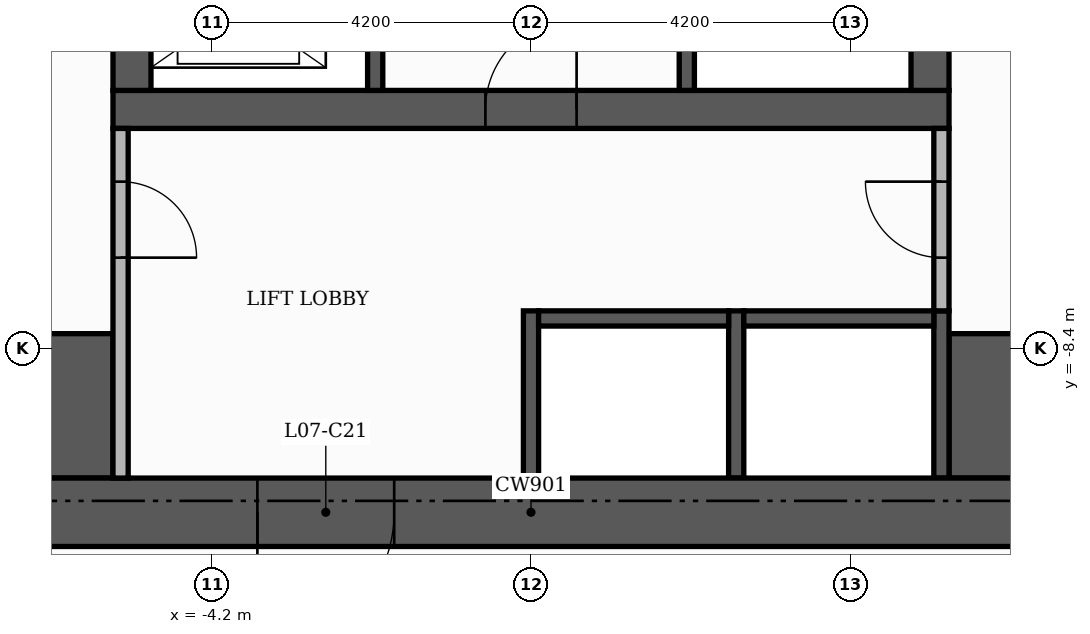
"""IFC4 building model, lengths in metres.
Left out: names, types, materials, properties, quantities, classifications, styles, units other than length and angle.
Written with IfcOpenShell. Run it as: python <this file> out.ifc"""

import sys

from ifc_helpers import new_model, si_unit, direction, frame, frame_2d, origin, place, context, subcontext, project, spatial, rectangle, extrude, element, fill, save


model = new_model("IFC4")
c1 = context("Model", 3, precision=1e-05, world=origin(), true_north=direction((0.0, 1.0)))
c2 = subcontext(c1, "Body", "Model", "MODEL_VIEW")
j1 = project(units=[si_unit("LENGTHUNIT", "METRE"), si_unit("PLANEANGLEUNIT", "RADIAN")], contexts=[c1])
p1 = place(None, origin())
s1 = spatial("IfcSite", under=j1, at=p1, CompositionType="ELEMENT")
p2 = place(p1, origin())
s2 = spatial("IfcBuilding", under=s1, at=p2, CompositionType="ELEMENT")
p3 = place(p2, frame((0.0, 0.0, 34.8)))
s3 = spatial("IfcBuildingStorey", under=s2, at=p3, CompositionType="ELEMENT", Elevation=34.8)
p4 = place(p3, frame((-5.5, -5.25, 0.0), z_axis=(0.0, 0.0, 1.0), x_axis=(1.0, 0.0, 0.0)))
e1 = element("IfcWall", 1, at=p4, inside=s3, PredefinedType="SHEAR", context=c2, shape_type="SweptSolid", body=[
    extrude(rectangle(XDim=11.0, YDim=0.5, at=frame_2d((5.5, 0.0))), origin(), (0.0, 0.0, 1.0), 3.48),
])
p5 = place(p4, frame((4.9, 0.0, 0.0)))
e2 = element("IfcOpeningElement", 2, at=p5, cuts=e1, PredefinedType="OPENING", context=c2, shape_type="SweptSolid", body=[
    extrude(rectangle(XDim=1.2, YDim=2.1, at=frame_2d((0.6, 1.05))), frame((0.0, 0.26, 0.0), z_axis=(0.0, -1.0, 0.0), x_axis=(1.0, 0.0, 0.0)), (0.0, 0.0, 1.0), 0.52),
])
for number, where, z_axis, x_axis in (
    (3, (-5.25, -5.0, 0.0), (0.0, 0.0, 1.0), (0.0, 1.0, 0.0)),
    (4, (5.25, -5.0, 0.0), (0.0, 0.0, 1.0), (0.0, 1.0, 0.0)),
):
    element("IfcWall", number, at=place(p3, frame(where, z_axis=z_axis, x_axis=x_axis)), inside=s3, PredefinedType="SHEAR", context=c2, shape_type="SweptSolid", body=[
        extrude(rectangle(XDim=10.5, YDim=0.5, at=frame_2d((5.25, 0.0))), origin(), (0.0, 0.0, 1.0), 3.48),
    ])
for number, where, z_axis, x_axis in (
    (5, (-10.1, -9.15, 0.0), (0.0, 0.0, 1.0), (1.0, 0.0, 0.0)),
    (6, (5.5, -9.15, 0.0), (0.0, 0.0, 1.0), (1.0, 0.0, 0.0)),
):
    element("IfcWall", number, at=place(p3, frame(where, z_axis=z_axis, x_axis=x_axis)), inside=s3, PredefinedType="SHEAR", context=c2, shape_type="SweptSolid", body=[
        extrude(rectangle(XDim=4.6, YDim=1.9, at=frame_2d((2.3, 0.0))), origin(), (0.0, 0.0, 1.0), 3.48),
    ])
p6 = place(p3, frame((2.05, -5.0, 0.0), z_axis=(0.0, 0.0, 1.0), x_axis=(0.0, 1.0, 0.0)))
e7 = element("IfcWall", 7, at=p6, inside=s3, PredefinedType="SHEAR", context=c2, shape_type="SweptSolid", body=[
    extrude(rectangle(XDim=6.6, YDim=0.2, at=frame_2d((3.3, 0.0))), origin(), (0.0, 0.0, 1.0), 3.48),
])
p7 = place(p6, frame((5.25, 0.0, 0.0)))
e8 = element("IfcOpeningElement", 8, at=p7, cuts=e7, PredefinedType="OPENING", context=c2, shape_type="SweptSolid", body=[
    extrude(rectangle(XDim=1.0, YDim=2.1, at=frame_2d((0.5, 1.05))), frame((0.0, 0.11, 0.0), z_axis=(0.0, -1.0, 0.0), x_axis=(1.0, 0.0, 0.0)), (0.0, 0.0, 1.0), 0.22),
])
for number, where, z_axis, x_axis in (
    (9, (0.0, -10.1, 0.0), (0.0, 0.0, 1.0), (0.0, 1.0, 0.0)),
    (10, (2.7, -10.1, 0.0), (0.0, 0.0, 1.0), (0.0, 1.0, 0.0)),
    (11, (5.4, -10.1, 0.0), (0.0, 0.0, 1.0), (0.0, 1.0, 0.0)),
):
    element("IfcWall", number, at=place(p3, frame(where, z_axis=z_axis, x_axis=x_axis)), inside=s3, PredefinedType="SHEAR", context=c2, shape_type="SweptSolid", body=[
        extrude(rectangle(XDim=2.2, YDim=0.2, at=frame_2d((1.1, 0.0))), origin(), (0.0, 0.0, 1.0), 3.48),
    ])
for number, where, z_axis, x_axis in (
    (12, (0.1, -8.0, 0.0), (0.0, 0.0, 1.0), (1.0, 0.0, 0.0)),
    (13, (2.8, -8.0, 0.0), (0.0, 0.0, 1.0), (1.0, 0.0, 0.0)),
):
    element("IfcWall", number, at=place(p3, frame(where, z_axis=z_axis, x_axis=x_axis)), inside=s3, PredefinedType="SHEAR", context=c2, shape_type="SweptSolid", body=[
        extrude(rectangle(XDim=2.5, YDim=0.2, at=frame_2d((1.25, 0.0))), origin(), (0.0, 0.0, 1.0), 3.48),
    ])
p8 = place(p3, frame((-2.05, -5.0, 0.0), z_axis=(0.0, 0.0, 1.0), x_axis=(0.0, 1.0, 0.0)))
e14 = element("IfcWall", 14, at=p8, inside=s3, PredefinedType="SHEAR", context=c2, shape_type="SweptSolid", body=[
    extrude(rectangle(XDim=3.4, YDim=0.2, at=frame_2d((1.7, 0.0))), origin(), (0.0, 0.0, 1.0), 3.48),
])
p9 = place(p8, frame((0.55, 0.0, 0.0)))
e15 = element("IfcOpeningElement", 15, at=p9, cuts=e14, PredefinedType="OPENING", context=c2, shape_type="SweptSolid", body=[
    extrude(rectangle(XDim=1.1, YDim=2.1, at=frame_2d((0.55, 1.05))), frame((0.0, 0.11, 0.0), z_axis=(0.0, -1.0, 0.0), x_axis=(1.0, 0.0, 0.0)), (0.0, 0.0, 1.0), 0.22),
])
p10 = place(p8, frame((2.45, 0.0, 0.0)))
e16 = element("IfcOpeningElement", 16, at=p10, cuts=e14, PredefinedType="OPENING", context=c2, shape_type="SweptSolid", body=[
    extrude(rectangle(XDim=0.8, YDim=2.1, at=frame_2d((0.4, 1.05))), frame((0.0, 0.11, 0.0), z_axis=(0.0, -1.0, 0.0), x_axis=(1.0, 0.0, 0.0)), (0.0, 0.0, 1.0), 0.22),
])
p11 = place(p3, frame((-11.0, -10.55, 0.0), z_axis=(0.0, 0.0, 1.0), x_axis=(1.0, 0.0, 0.0)))
e17 = element("IfcWall", 17, at=p11, inside=s3, PredefinedType="SHEAR", context=c2, shape_type="SweptSolid", body=[
    extrude(rectangle(XDim=22.0, YDim=0.9, at=frame_2d((11.0, 0.0))), origin(), (0.0, 0.0, 1.0), 3.48),
])
p12 = place(p11, frame((7.4, 0.0, 0.0)))
e18 = element("IfcOpeningElement", 18, at=p12, cuts=e17, PredefinedType="OPENING", context=c2, shape_type="SweptSolid", body=[
    extrude(rectangle(XDim=1.8, YDim=2.2, at=frame_2d((0.9, 1.1))), frame((0.0, 0.46, 0.0), z_axis=(0.0, -1.0, 0.0), x_axis=(1.0, 0.0, 0.0)), (0.0, 0.0, 1.0), 0.92),
])
p13 = place(p3, frame((-5.4, -10.1, 0.0), z_axis=(0.0, 0.0, 1.0), x_axis=(0.0, 1.0, 0.0)))
e19 = element("IfcWall", 19, at=p13, inside=s3, PredefinedType="PARTITIONING", context=c2, shape_type="SweptSolid", body=[
    extrude(rectangle(XDim=4.6, YDim=0.2, at=frame_2d((2.3, 0.0))), origin(), (0.0, 0.0, 1.0), 3.48),
])
p14 = place(p13, frame((2.9, 0.0, 0.0)))
e20 = element("IfcOpeningElement", 20, at=p14, cuts=e19, PredefinedType="OPENING", context=c2, shape_type="SweptSolid", body=[
    extrude(rectangle(XDim=1.0, YDim=2.1, at=frame_2d((0.5, 1.05))), frame((0.0, 0.11, 0.0), z_axis=(0.0, -1.0, 0.0), x_axis=(1.0, 0.0, 0.0)), (0.0, 0.0, 1.0), 0.22),
])
p15 = place(p3, frame((5.4, -7.9, 0.0), z_axis=(0.0, 0.0, 1.0), x_axis=(0.0, 1.0, 0.0)))
e21 = element("IfcWall", 21, at=p15, inside=s3, PredefinedType="PARTITIONING", context=c2, shape_type="SweptSolid", body=[
    extrude(rectangle(XDim=2.4, YDim=0.2, at=frame_2d((1.2, 0.0))), origin(), (0.0, 0.0, 1.0), 3.48),
])
p16 = place(p15, frame((0.7, 0.0, 0.0)))
e22 = element("IfcOpeningElement", 22, at=p16, cuts=e21, PredefinedType="OPENING", context=c2, shape_type="SweptSolid", body=[
    extrude(rectangle(XDim=1.0, YDim=2.1, at=frame_2d((0.5, 1.05))), frame((0.0, 0.11, 0.0), z_axis=(0.0, -1.0, 0.0), x_axis=(1.0, 0.0, 0.0)), (0.0, 0.0, 1.0), 0.22),
])
p17 = place(p5, origin())
e23 = element("IfcDoor", 23, at=p17, inside=s3, OperationType="SINGLE_SWING_RIGHT", PredefinedType="DOOR", context=c2, shape_type="SweptSolid", body=[
    extrude(rectangle(XDim=1.2, YDim=2.1, at=frame_2d((0.6, 1.05))), frame((0.0, 0.025, 0.0), z_axis=(0.0, -1.0, 0.0), x_axis=(1.0, 0.0, 0.0)), (0.0, 0.0, 1.0), 0.05),
])
fill(e2, e23)
p18 = place(p14, frame((1.0, 0.0, 0.0), z_axis=(0.0, 0.0, 1.0), x_axis=(-1.0, 0.0, 0.0)))
e24 = element("IfcDoor", 24, at=p18, inside=s3, OperationType="SINGLE_SWING_LEFT", PredefinedType="DOOR", context=c2, shape_type="SweptSolid", body=[
    extrude(rectangle(XDim=1.0, YDim=2.1, at=frame_2d((0.5, 1.05))), frame((0.0, 0.025, 0.0), z_axis=(0.0, -1.0, 0.0), x_axis=(1.0, 0.0, 0.0)), (0.0, 0.0, 1.0), 0.05),
])
fill(e20, e24)
p19 = place(p16, origin())
e25 = element("IfcDoor", 25, at=p19, inside=s3, OperationType="SINGLE_SWING_RIGHT", PredefinedType="DOOR", context=c2, shape_type="SweptSolid", body=[
    extrude(rectangle(XDim=1.0, YDim=2.1, at=frame_2d((0.5, 1.05))), frame((0.0, 0.025, 0.0), z_axis=(0.0, -1.0, 0.0), x_axis=(1.0, 0.0, 0.0)), (0.0, 0.0, 1.0), 0.05),
])
fill(e22, e25)
p20 = place(p12, frame((1.8, 0.0, 0.0), z_axis=(0.0, 0.0, 1.0), x_axis=(-1.0, 0.0, 0.0)))
e26 = element("IfcDoor", 26, at=p20, inside=s3, OperationType="DOUBLE_DOOR_SINGLE_SWING", PredefinedType="DOOR", context=c2, shape_type="SweptSolid", body=[
    extrude(rectangle(XDim=1.8, YDim=2.2, at=frame_2d((0.9, 1.1))), frame((0.0, 0.025, 0.0), z_axis=(0.0, -1.0, 0.0), x_axis=(1.0, 0.0, 0.0)), (0.0, 0.0, 1.0), 0.05),
])
fill(e18, e26)
save(model, sys.argv[1])
